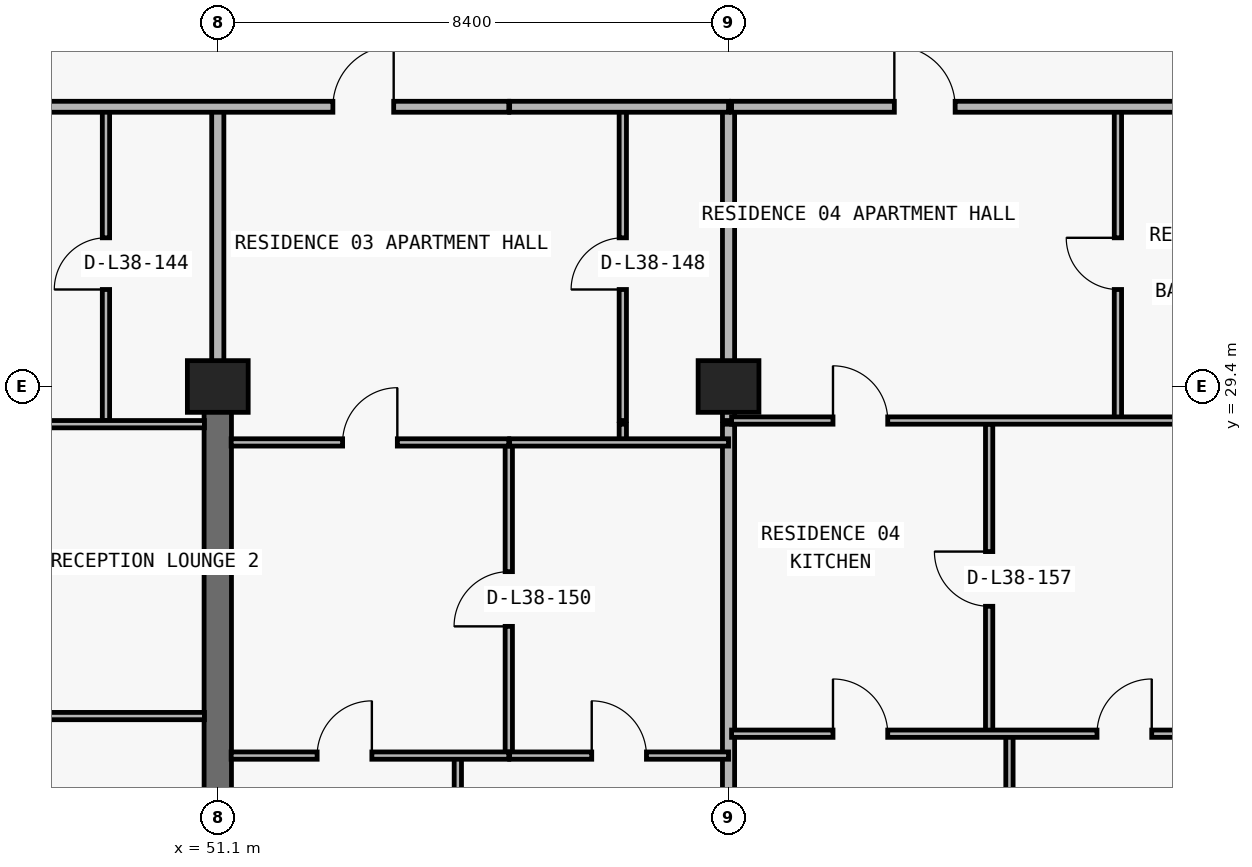
"""IFC4 building model, lengths in metres.
Left out: names, types, materials, properties, quantities, classifications, styles, units other than length and angle.
Written with IfcOpenShell. Run it as: python <this file> out.ifc"""

import sys

from ifc_helpers import new_model, si_unit, direction, frame, frame_2d, origin, origin_2d, place, context, subcontext, project, spatial, rectangle, extrude, element, fill, save


model = new_model("IFC4")
c1 = context("Model", 3, precision=1e-05, world=origin(), true_north=direction((0.0, 1.0)))
c2 = subcontext(c1, "Body", "Model", "MODEL_VIEW")
j1 = project(units=[si_unit("LENGTHUNIT", "METRE"), si_unit("PLANEANGLEUNIT", "RADIAN")], contexts=[c1])
p1 = place(None, origin())
s1 = spatial("IfcSite", under=j1, at=p1, CompositionType="ELEMENT")
p2 = place(p1, origin())
s2 = spatial("IfcBuilding", under=s1, at=p2, CompositionType="ELEMENT")
p3 = place(p2, frame((0.0, 0.0, 138.9)))
s3 = spatial("IfcBuildingStorey", under=s2, at=p3, CompositionType="ELEMENT", Elevation=138.9)
for number, where, z_axis, x_axis in (
    (1, (51.1, 29.4, 0.0), (0.0, 0.0, 1.0), (1.0, 0.0, 0.0)),
    (2, (59.5, 29.4, 0.0), (0.0, 0.0, 1.0), (1.0, 0.0, 0.0)),
):
    element("IfcColumn", number, at=place(p3, frame(where, z_axis=z_axis, x_axis=x_axis)), inside=s3, PredefinedType="COLUMN", context=c2, shape_type="SweptSolid", body=[
        extrude(rectangle(XDim=1.0, YDim=0.85, at=origin_2d()), origin(), (0.0, 0.0, 1.0), 3.05),
    ])
p4 = place(p3, frame((51.1, 20.8, 0.0), z_axis=(0.0, 0.0, 1.0), x_axis=(0.0, 1.0, 0.0)))
e3 = element("IfcWall", 3, at=p4, inside=s3, PredefinedType="SHEAR", context=c2, shape_type="SweptSolid", body=[
    extrude(rectangle(XDim=8.6, YDim=0.45, at=frame_2d((4.3, 0.0))), origin(), (0.0, 0.0, 1.0), 3.05),
])
p5 = place(p3, frame((49.261, 28.84, 0.0), z_axis=(0.0, 0.0, 1.0), x_axis=(0.0, 1.0, 0.0)))
e4 = element("IfcWall", 4, at=p5, inside=s3, PredefinedType="PARTITIONING", context=c2, shape_type="SweptSolid", body=[
    extrude(rectangle(XDim=5.16, YDim=0.12, at=frame_2d((2.58, 0.0))), origin(), (0.0, 0.0, 1.0), 3.05),
])
p6 = place(p5, frame((2.155, 0.0, 0.0)))
e5 = element("IfcOpeningElement", 5, at=p6, cuts=e4, PredefinedType="OPENING", context=c2, shape_type="SweptSolid", body=[
    extrude(rectangle(XDim=0.85, YDim=2.1, at=frame_2d((0.425, 1.05))), frame((0.0, 0.07, 0.0), z_axis=(0.0, -1.0, 0.0), x_axis=(1.0, 0.0, 0.0)), (0.0, 0.0, 1.0), 0.14),
])
p7 = place(p3, frame((51.1, 29.405, 0.0), z_axis=(0.0, 0.0, 1.0), x_axis=(0.0, 1.0, 0.0)))
e6 = element("IfcWall", 6, at=p7, inside=s3, PredefinedType="PARTITIONING", context=c2, shape_type="SweptSolid", body=[
    extrude(rectangle(XDim=4.595, YDim=0.2, at=frame_2d((2.297, 0.0))), origin(), (0.0, 0.0, 1.0), 2.335),
])
p8 = place(p3, frame((55.048, 8.84, 0.0), z_axis=(0.0, 0.0, 1.0), x_axis=(0.0, 1.0, 0.0)))
e7 = element("IfcWall", 7, at=p8, inside=s3, PredefinedType="PARTITIONING", context=c2, shape_type="SweptSolid", body=[
    extrude(rectangle(XDim=14.49, YDim=0.12, at=frame_2d((7.245, 0.0))), origin(), (0.0, 0.0, 1.0), 3.05),
])
p9 = place(p3, frame((55.886, 23.33, 0.0), z_axis=(0.0, 0.0, 1.0), x_axis=(0.0, 1.0, 0.0)))
e8 = element("IfcWall", 8, at=p9, inside=s3, PredefinedType="PARTITIONING", context=c2, shape_type="SweptSolid", body=[
    extrude(rectangle(XDim=5.15, YDim=0.12, at=frame_2d((2.575, 0.0))), origin(), (0.0, 0.0, 1.0), 3.05),
])
p10 = place(p9, frame((2.125, 0.0, 0.0)))
e9 = element("IfcOpeningElement", 9, at=p10, cuts=e8, PredefinedType="OPENING", context=c2, shape_type="SweptSolid", body=[
    extrude(rectangle(XDim=0.9, YDim=2.15, at=frame_2d((0.45, 1.075))), frame((0.0, 0.07, 0.0), z_axis=(0.0, -1.0, 0.0), x_axis=(1.0, 0.0, 0.0)), (0.0, 0.0, 1.0), 0.14),
])
p11 = place(p3, frame((57.761, 28.48, 0.0), z_axis=(0.0, 0.0, 1.0), x_axis=(0.0, 1.0, 0.0)))
e10 = element("IfcWall", 10, at=p11, inside=s3, PredefinedType="PARTITIONING", context=c2, shape_type="SweptSolid", body=[
    extrude(rectangle(XDim=0.3, YDim=0.12, at=frame_2d((0.15, 0.0))), origin(), (0.0, 0.0, 1.0), 3.05),
])
p12 = place(p3, frame((57.761, 28.84, 0.0), z_axis=(0.0, 0.0, 1.0), x_axis=(0.0, 1.0, 0.0)))
e11 = element("IfcWall", 11, at=p12, inside=s3, PredefinedType="PARTITIONING", context=c2, shape_type="SweptSolid", body=[
    extrude(rectangle(XDim=5.16, YDim=0.12, at=frame_2d((2.58, 0.0))), origin(), (0.0, 0.0, 1.0), 3.05),
])
p13 = place(p12, frame((2.155, 0.0, 0.0)))
e12 = element("IfcOpeningElement", 12, at=p13, cuts=e11, PredefinedType="OPENING", context=c2, shape_type="SweptSolid", body=[
    extrude(rectangle(XDim=0.85, YDim=2.1, at=frame_2d((0.425, 1.05))), frame((0.0, 0.07, 0.0), z_axis=(0.0, -1.0, 0.0), x_axis=(1.0, 0.0, 0.0)), (0.0, 0.0, 1.0), 0.14),
])
p14 = place(p3, frame((59.5, 8.84, 0.0), z_axis=(0.0, 0.0, 1.0), x_axis=(0.0, 1.0, 0.0)))
e13 = element("IfcWall", 13, at=p14, inside=s3, PredefinedType="PARTITIONING", context=c2, shape_type="SweptSolid", body=[
    extrude(rectangle(XDim=19.94, YDim=0.2, at=frame_2d((9.97, 0.0))), origin(), (0.0, 0.0, 1.0), 2.174),
])
p15 = place(p3, frame((59.5, 28.84, 0.0), z_axis=(0.0, 0.0, 1.0), x_axis=(0.0, 1.0, 0.0)))
e14 = element("IfcWall", 14, at=p15, inside=s3, PredefinedType="PARTITIONING", context=c2, shape_type="SweptSolid", body=[
    extrude(rectangle(XDim=5.16, YDim=0.2, at=frame_2d((2.58, 0.0))), origin(), (0.0, 0.0, 1.0), 2.174),
])
p16 = place(p3, frame((63.786, 23.69, 0.0), z_axis=(0.0, 0.0, 1.0), x_axis=(0.0, 1.0, 0.0)))
e15 = element("IfcWall", 15, at=p16, inside=s3, PredefinedType="PARTITIONING", context=c2, shape_type="SweptSolid", body=[
    extrude(rectangle(XDim=5.09, YDim=0.12, at=frame_2d((2.545, 0.0))), origin(), (0.0, 0.0, 1.0), 3.05),
])
p17 = place(p16, frame((2.095, 0.0, 0.0)))
e16 = element("IfcOpeningElement", 16, at=p17, cuts=e15, PredefinedType="OPENING", context=c2, shape_type="SweptSolid", body=[
    extrude(rectangle(XDim=0.9, YDim=2.15, at=frame_2d((0.45, 1.075))), frame((0.0, 0.07, 0.0), z_axis=(0.0, -1.0, 0.0), x_axis=(1.0, 0.0, 0.0)), (0.0, 0.0, 1.0), 0.14),
])
p18 = place(p3, frame((64.12, 8.84, 0.0), z_axis=(0.0, 0.0, 1.0), x_axis=(0.0, 1.0, 0.0)))
e17 = element("IfcWall", 17, at=p18, inside=s3, PredefinedType="PARTITIONING", context=c2, shape_type="SweptSolid", body=[
    extrude(rectangle(XDim=14.85, YDim=0.12, at=frame_2d((7.425, 0.0))), origin(), (0.0, 0.0, 1.0), 3.05),
])
p19 = place(p3, frame((65.904, 28.84, 0.0), z_axis=(0.0, 0.0, 1.0), x_axis=(0.0, 1.0, 0.0)))
e18 = element("IfcWall", 18, at=p19, inside=s3, PredefinedType="PARTITIONING", context=c2, shape_type="SweptSolid", body=[
    extrude(rectangle(XDim=5.16, YDim=0.12, at=frame_2d((2.58, 0.0))), origin(), (0.0, 0.0, 1.0), 3.05),
])
p20 = place(p19, frame((2.155, 0.0, 0.0)))
e19 = element("IfcOpeningElement", 19, at=p20, cuts=e18, PredefinedType="OPENING", context=c2, shape_type="SweptSolid", body=[
    extrude(rectangle(XDim=0.85, YDim=2.1, at=frame_2d((0.425, 1.05))), frame((0.0, 0.07, 0.0), z_axis=(0.0, -1.0, 0.0), x_axis=(1.0, 0.0, 0.0)), (0.0, 0.0, 1.0), 0.14),
])
p21 = place(p3, frame((51.32, 23.33, 0.0), z_axis=(0.0, 0.0, 1.0), x_axis=(1.0, 0.0, 0.0)))
e20 = element("IfcWall", 20, at=p21, inside=s3, PredefinedType="PARTITIONING", context=c2, shape_type="SweptSolid", body=[
    extrude(rectangle(XDim=4.566, YDim=0.12, at=frame_2d((2.283, 0.0))), origin(), (0.0, 0.0, 1.0), 3.05),
])
p22 = place(p21, frame((1.414, 0.0, 0.0)))
e21 = element("IfcOpeningElement", 21, at=p22, cuts=e20, PredefinedType="OPENING", context=c2, shape_type="SweptSolid", body=[
    extrude(rectangle(XDim=0.9, YDim=2.15, at=frame_2d((0.45, 1.075))), frame((0.0, 0.07, 0.0), z_axis=(0.0, -1.0, 0.0), x_axis=(1.0, 0.0, 0.0)), (0.0, 0.0, 1.0), 0.14),
])
p23 = place(p3, frame((55.9, 23.33, 0.0), z_axis=(0.0, 0.0, 1.0), x_axis=(1.0, 0.0, 0.0)))
e22 = element("IfcWall", 22, at=p23, inside=s3, PredefinedType="PARTITIONING", context=c2, shape_type="SweptSolid", body=[
    extrude(rectangle(XDim=3.6, YDim=0.12, at=frame_2d((1.8, 0.0))), origin(), (0.0, 0.0, 1.0), 3.05),
])
p24 = place(p23, frame((1.35, 0.0, 0.0)))
e23 = element("IfcOpeningElement", 23, at=p24, cuts=e22, PredefinedType="OPENING", context=c2, shape_type="SweptSolid", body=[
    extrude(rectangle(XDim=0.9, YDim=2.15, at=frame_2d((0.45, 1.075))), frame((0.0, 0.07, 0.0), z_axis=(0.0, -1.0, 0.0), x_axis=(1.0, 0.0, 0.0)), (0.0, 0.0, 1.0), 0.14),
])
p25 = place(p3, frame((59.55, 23.69, 0.0), z_axis=(0.0, 0.0, 1.0), x_axis=(1.0, 0.0, 0.0)))
e24 = element("IfcWall", 24, at=p25, inside=s3, PredefinedType="PARTITIONING", context=c2, shape_type="SweptSolid", body=[
    extrude(rectangle(XDim=8.35, YDim=0.12, at=frame_2d((4.175, 0.0))), origin(), (0.0, 0.0, 1.0), 3.05),
])
p26 = place(p25, frame((1.668, 0.0, 0.0)))
e25 = element("IfcOpeningElement", 25, at=p26, cuts=e24, PredefinedType="OPENING", context=c2, shape_type="SweptSolid", body=[
    extrude(rectangle(XDim=0.9, YDim=2.15, at=frame_2d((0.45, 1.075))), frame((0.0, 0.07, 0.0), z_axis=(0.0, -1.0, 0.0), x_axis=(1.0, 0.0, 0.0)), (0.0, 0.0, 1.0), 0.14),
])
p27 = place(p25, frame((6.01, 0.0, 0.0)))
e26 = element("IfcOpeningElement", 26, at=p27, cuts=e24, PredefinedType="OPENING", context=c2, shape_type="SweptSolid", body=[
    extrude(rectangle(XDim=0.9, YDim=2.15, at=frame_2d((0.45, 1.075))), frame((0.0, 0.07, 0.0), z_axis=(0.0, -1.0, 0.0), x_axis=(1.0, 0.0, 0.0)), (0.0, 0.0, 1.0), 0.14),
])
p28 = place(p3, frame((42.7, 23.98, 0.0), z_axis=(0.0, 0.0, 1.0), x_axis=(1.0, 0.0, 0.0)))
e27 = element("IfcWall", 27, at=p28, inside=s3, PredefinedType="PARTITIONING", context=c2, shape_type="SweptSolid", body=[
    extrude(rectangle(XDim=8.18, YDim=0.12, at=frame_2d((4.09, 0.0))), origin(), (0.0, 0.0, 1.0), 3.05),
])
p29 = place(p28, frame((3.64, 0.0, 0.0)))
e28 = element("IfcOpeningElement", 28, at=p29, cuts=e27, PredefinedType="OPENING", context=c2, shape_type="SweptSolid", body=[
    extrude(rectangle(XDim=0.9, YDim=2.15, at=frame_2d((0.45, 1.075))), frame((0.0, 0.07, 0.0), z_axis=(0.0, -1.0, 0.0), x_axis=(1.0, 0.0, 0.0)), (0.0, 0.0, 1.0), 0.14),
])
p30 = place(p3, frame((51.32, 28.48, 0.0), z_axis=(0.0, 0.0, 1.0), x_axis=(1.0, 0.0, 0.0)))
e29 = element("IfcWall", 29, at=p30, inside=s3, PredefinedType="PARTITIONING", context=c2, shape_type="SweptSolid", body=[
    extrude(rectangle(XDim=4.566, YDim=0.12, at=frame_2d((2.283, 0.0))), origin(), (0.0, 0.0, 1.0), 3.05),
])
p31 = place(p30, frame((1.833, 0.0, 0.0)))
e30 = element("IfcOpeningElement", 30, at=p31, cuts=e29, PredefinedType="OPENING", context=c2, shape_type="SweptSolid", body=[
    extrude(rectangle(XDim=0.9, YDim=2.15, at=frame_2d((0.45, 1.075))), frame((0.0, 0.07, 0.0), z_axis=(0.0, -1.0, 0.0), x_axis=(1.0, 0.0, 0.0)), (0.0, 0.0, 1.0), 0.14),
])
p32 = place(p3, frame((55.9, 28.48, 0.0), z_axis=(0.0, 0.0, 1.0), x_axis=(1.0, 0.0, 0.0)))
e31 = element("IfcWall", 31, at=p32, inside=s3, PredefinedType="PARTITIONING", context=c2, shape_type="SweptSolid", body=[
    extrude(rectangle(XDim=3.6, YDim=0.12, at=frame_2d((1.8, 0.0))), origin(), (0.0, 0.0, 1.0), 3.05),
])
p33 = place(p3, frame((42.7, 28.78, 0.0), z_axis=(0.0, 0.0, 1.0), x_axis=(1.0, 0.0, 0.0)))
e32 = element("IfcWall", 32, at=p33, inside=s3, PredefinedType="PARTITIONING", context=c2, shape_type="SweptSolid", body=[
    extrude(rectangle(XDim=8.18, YDim=0.12, at=frame_2d((4.09, 0.0))), origin(), (0.0, 0.0, 1.0), 3.05),
])
p34 = place(p33, frame((2.831, 0.0, 0.0)))
e33 = element("IfcOpeningElement", 33, at=p34, cuts=e32, PredefinedType="OPENING", context=c2, shape_type="SweptSolid", body=[
    extrude(rectangle(XDim=0.9, YDim=2.15, at=frame_2d((0.45, 1.075))), frame((0.0, 0.07, 0.0), z_axis=(0.0, -1.0, 0.0), x_axis=(1.0, 0.0, 0.0)), (0.0, 0.0, 1.0), 0.14),
])
p35 = place(p3, frame((59.55, 28.84, 0.0), z_axis=(0.0, 0.0, 1.0), x_axis=(1.0, 0.0, 0.0)))
e34 = element("IfcWall", 34, at=p35, inside=s3, PredefinedType="PARTITIONING", context=c2, shape_type="SweptSolid", body=[
    extrude(rectangle(XDim=8.35, YDim=0.12, at=frame_2d((4.175, 0.0))), origin(), (0.0, 0.0, 1.0), 3.05),
])
p36 = place(p35, frame((1.668, 0.0, 0.0)))
e35 = element("IfcOpeningElement", 35, at=p36, cuts=e34, PredefinedType="OPENING", context=c2, shape_type="SweptSolid", body=[
    extrude(rectangle(XDim=0.9, YDim=2.15, at=frame_2d((0.45, 1.075))), frame((0.0, 0.07, 0.0), z_axis=(0.0, -1.0, 0.0), x_axis=(1.0, 0.0, 0.0)), (0.0, 0.0, 1.0), 0.14),
])
p37 = place(p3, frame((18.3, 34.0, 0.0), z_axis=(0.0, 0.0, 1.0), x_axis=(1.0, 0.0, 0.0)))
e36 = element("IfcWall", 36, at=p37, inside=s3, PredefinedType="PARTITIONING", context=c2, shape_type="SweptSolid", body=[
    extrude(rectangle(XDim=37.586, YDim=0.18, at=frame_2d((18.793, 0.0))), origin(), (0.0, 0.0, 1.0), 3.05),
])
p38 = place(p37, frame((11.162, 0.0, 0.0)))
e37 = element("IfcOpeningElement", 37, at=p38, cuts=e36, PredefinedType="OPENING", context=c2, shape_type="SweptSolid", body=[
    extrude(rectangle(XDim=1.0, YDim=2.2, at=frame_2d((0.5, 1.1))), frame((0.0, 0.1, 0.0), z_axis=(0.0, -1.0, 0.0), x_axis=(1.0, 0.0, 0.0)), (0.0, 0.0, 1.0), 0.2),
])
p39 = place(p37, frame((34.693, 0.0, 0.0)))
e38 = element("IfcOpeningElement", 38, at=p39, cuts=e36, PredefinedType="OPENING", context=c2, shape_type="SweptSolid", body=[
    extrude(rectangle(XDim=1.0, YDim=2.2, at=frame_2d((0.5, 1.1))), frame((0.0, 0.1, 0.0), z_axis=(0.0, -1.0, 0.0), x_axis=(1.0, 0.0, 0.0)), (0.0, 0.0, 1.0), 0.2),
])
p40 = place(p3, frame((55.9, 34.0, 0.0), z_axis=(0.0, 0.0, 1.0), x_axis=(1.0, 0.0, 0.0)))
e39 = element("IfcWall", 39, at=p40, inside=s3, PredefinedType="PARTITIONING", context=c2, shape_type="SweptSolid", body=[
    extrude(rectangle(XDim=3.6, YDim=0.18, at=frame_2d((1.8, 0.0))), origin(), (0.0, 0.0, 1.0), 3.05),
])
p41 = place(p3, frame((59.55, 34.0, 0.0), z_axis=(0.0, 0.0, 1.0), x_axis=(1.0, 0.0, 0.0)))
e40 = element("IfcWall", 40, at=p41, inside=s3, PredefinedType="PARTITIONING", context=c2, shape_type="SweptSolid", body=[
    extrude(rectangle(XDim=10.55, YDim=0.18, at=frame_2d((5.275, 0.0))), origin(), (0.0, 0.0, 1.0), 3.05),
])
p42 = place(p41, frame((2.677, 0.0, 0.0)))
e41 = element("IfcOpeningElement", 41, at=p42, cuts=e40, PredefinedType="OPENING", context=c2, shape_type="SweptSolid", body=[
    extrude(rectangle(XDim=1.0, YDim=2.2, at=frame_2d((0.5, 1.1))), frame((0.0, 0.1, 0.0), z_axis=(0.0, -1.0, 0.0), x_axis=(1.0, 0.0, 0.0)), (0.0, 0.0, 1.0), 0.2),
])
p43 = place(p6, origin())
e42 = element("IfcDoor", 42, at=p43, inside=s3, OperationType="SINGLE_SWING_LEFT", PredefinedType="DOOR", context=c2, shape_type="SweptSolid", body=[
    extrude(rectangle(XDim=0.85, YDim=2.1, at=frame_2d((0.425, 1.05))), frame((0.0, 0.025, 0.0), z_axis=(0.0, -1.0, 0.0), x_axis=(1.0, 0.0, 0.0)), (0.0, 0.0, 1.0), 0.05),
])
fill(e5, e42)
p44 = place(p39, origin())
e43 = element("IfcDoor", 43, at=p44, inside=s3, OperationType="SINGLE_SWING_RIGHT", PredefinedType="DOOR", context=c2, shape_type="SweptSolid", body=[
    extrude(rectangle(XDim=1.0, YDim=2.2, at=frame_2d((0.5, 1.1))), frame((0.0, 0.025, 0.0), z_axis=(0.0, -1.0, 0.0), x_axis=(1.0, 0.0, 0.0)), (0.0, 0.0, 1.0), 0.05),
])
fill(e38, e43)
p45 = place(p13, origin())
e44 = element("IfcDoor", 44, at=p45, inside=s3, OperationType="SINGLE_SWING_LEFT", PredefinedType="DOOR", context=c2, shape_type="SweptSolid", body=[
    extrude(rectangle(XDim=0.85, YDim=2.1, at=frame_2d((0.425, 1.05))), frame((0.0, 0.025, 0.0), z_axis=(0.0, -1.0, 0.0), x_axis=(1.0, 0.0, 0.0)), (0.0, 0.0, 1.0), 0.05),
])
fill(e12, e44)
p46 = place(p31, origin())
e45 = element("IfcDoor", 45, at=p46, inside=s3, OperationType="SINGLE_SWING_RIGHT", PredefinedType="DOOR", context=c2, shape_type="SweptSolid", body=[
    extrude(rectangle(XDim=0.9, YDim=2.15, at=frame_2d((0.45, 1.075))), frame((0.0, 0.025, 0.0), z_axis=(0.0, -1.0, 0.0), x_axis=(1.0, 0.0, 0.0)), (0.0, 0.0, 1.0), 0.05),
])
fill(e30, e45)
p47 = place(p10, origin())
e46 = element("IfcDoor", 46, at=p47, inside=s3, OperationType="SINGLE_SWING_LEFT", PredefinedType="DOOR", context=c2, shape_type="SweptSolid", body=[
    extrude(rectangle(XDim=0.9, YDim=2.15, at=frame_2d((0.45, 1.075))), frame((0.0, 0.025, 0.0), z_axis=(0.0, -1.0, 0.0), x_axis=(1.0, 0.0, 0.0)), (0.0, 0.0, 1.0), 0.05),
])
fill(e9, e46)
p48 = place(p22, origin())
e47 = element("IfcDoor", 47, at=p48, inside=s3, OperationType="SINGLE_SWING_RIGHT", PredefinedType="DOOR", context=c2, shape_type="SweptSolid", body=[
    extrude(rectangle(XDim=0.9, YDim=2.15, at=frame_2d((0.45, 1.075))), frame((0.0, 0.025, 0.0), z_axis=(0.0, -1.0, 0.0), x_axis=(1.0, 0.0, 0.0)), (0.0, 0.0, 1.0), 0.05),
])
fill(e21, e47)
p49 = place(p24, origin())
e48 = element("IfcDoor", 48, at=p49, inside=s3, OperationType="SINGLE_SWING_LEFT", PredefinedType="DOOR", context=c2, shape_type="SweptSolid", body=[
    extrude(rectangle(XDim=0.9, YDim=2.15, at=frame_2d((0.45, 1.075))), frame((0.0, 0.025, 0.0), z_axis=(0.0, -1.0, 0.0), x_axis=(1.0, 0.0, 0.0)), (0.0, 0.0, 1.0), 0.05),
])
fill(e23, e48)
p50 = place(p42, origin())
e49 = element("IfcDoor", 49, at=p50, inside=s3, OperationType="SINGLE_SWING_LEFT", PredefinedType="DOOR", context=c2, shape_type="SweptSolid", body=[
    extrude(rectangle(XDim=1.0, YDim=2.2, at=frame_2d((0.5, 1.1))), frame((0.0, 0.025, 0.0), z_axis=(0.0, -1.0, 0.0), x_axis=(1.0, 0.0, 0.0)), (0.0, 0.0, 1.0), 0.05),
])
fill(e41, e49)
p51 = place(p20, origin())
e50 = element("IfcDoor", 50, at=p51, inside=s3, OperationType="SINGLE_SWING_RIGHT", PredefinedType="DOOR", context=c2, shape_type="SweptSolid", body=[
    extrude(rectangle(XDim=0.85, YDim=2.1, at=frame_2d((0.425, 1.05))), frame((0.0, 0.025, 0.0), z_axis=(0.0, -1.0, 0.0), x_axis=(1.0, 0.0, 0.0)), (0.0, 0.0, 1.0), 0.05),
])
fill(e19, e50)
p52 = place(p36, origin())
e51 = element("IfcDoor", 51, at=p52, inside=s3, OperationType="SINGLE_SWING_LEFT", PredefinedType="DOOR", context=c2, shape_type="SweptSolid", body=[
    extrude(rectangle(XDim=0.9, YDim=2.15, at=frame_2d((0.45, 1.075))), frame((0.0, 0.025, 0.0), z_axis=(0.0, -1.0, 0.0), x_axis=(1.0, 0.0, 0.0)), (0.0, 0.0, 1.0), 0.05),
])
fill(e35, e51)
p53 = place(p17, origin())
e52 = element("IfcDoor", 52, at=p53, inside=s3, OperationType="SINGLE_SWING_RIGHT", PredefinedType="DOOR", context=c2, shape_type="SweptSolid", body=[
    extrude(rectangle(XDim=0.9, YDim=2.15, at=frame_2d((0.45, 1.075))), frame((0.0, 0.025, 0.0), z_axis=(0.0, -1.0, 0.0), x_axis=(1.0, 0.0, 0.0)), (0.0, 0.0, 1.0), 0.05),
])
fill(e16, e52)
p54 = place(p26, origin())
e53 = element("IfcDoor", 53, at=p54, inside=s3, OperationType="SINGLE_SWING_LEFT", PredefinedType="DOOR", context=c2, shape_type="SweptSolid", body=[
    extrude(rectangle(XDim=0.9, YDim=2.15, at=frame_2d((0.45, 1.075))), frame((0.0, 0.025, 0.0), z_axis=(0.0, -1.0, 0.0), x_axis=(1.0, 0.0, 0.0)), (0.0, 0.0, 1.0), 0.05),
])
fill(e25, e53)
p55 = place(p27, origin())
e54 = element("IfcDoor", 54, at=p55, inside=s3, OperationType="SINGLE_SWING_RIGHT", PredefinedType="DOOR", context=c2, shape_type="SweptSolid", body=[
    extrude(rectangle(XDim=0.9, YDim=2.15, at=frame_2d((0.45, 1.075))), frame((0.0, 0.025, 0.0), z_axis=(0.0, -1.0, 0.0), x_axis=(1.0, 0.0, 0.0)), (0.0, 0.0, 1.0), 0.05),
])
fill(e26, e54)
save(model, sys.argv[1])
